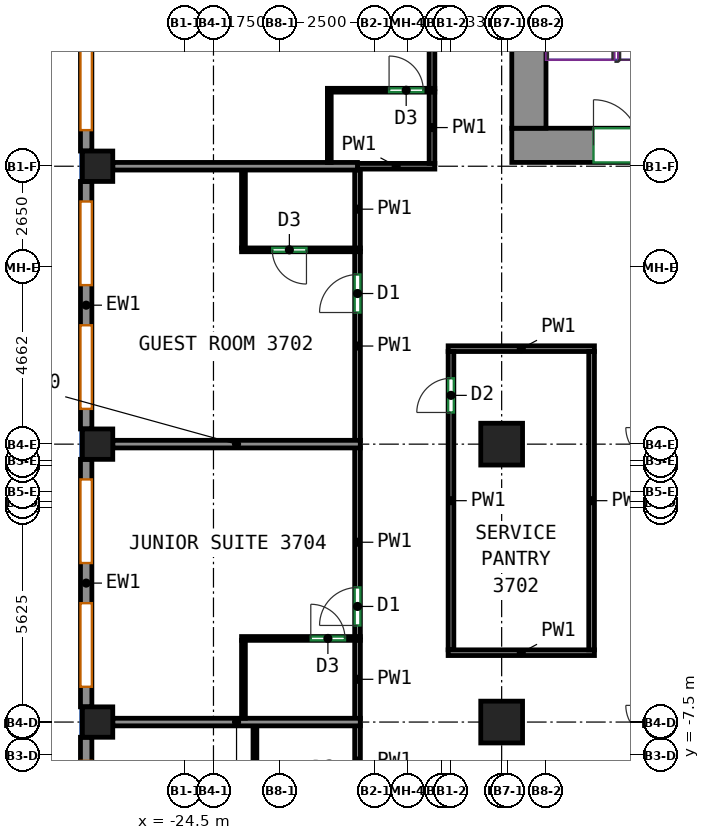
"""IFC4 building model, lengths in metres.
Left out: names, types, materials, properties, quantities, classifications, styles, units other than length and angle.
Written with IfcOpenShell. Run it as: python <this file> out.ifc"""

import sys

from ifc_helpers import new_model, si_unit, direction, frame, frame_2d, origin, origin_2d, place, context, subcontext, project, spatial, rectangle, extrude, source, transform, mapped, element, fill, save


model = new_model("IFC4")
c1 = context("Model", 3, precision=1e-05, world=origin(), true_north=direction((0.0, 1.0)))
c2 = subcontext(c1, "Body", "Model", "MODEL_VIEW")
j1 = project(units=[si_unit("LENGTHUNIT", "METRE"), si_unit("PLANEANGLEUNIT", "RADIAN")], contexts=[c1])
p1 = place(None, origin())
s1 = spatial("IfcSite", under=j1, at=p1, CompositionType="ELEMENT")
p2 = place(p1, origin())
s2 = spatial("IfcBuilding", under=s1, at=p2, CompositionType="ELEMENT")
p3 = place(p2, frame((0.0, 0.0, 160.9)))
s3 = spatial("IfcBuildingStorey", under=s2, at=p3, CompositionType="ELEMENT", Elevation=160.9)
m1 = source(origin(), c2, "Body", "SweptSolid", [
    extrude(rectangle(XDim=0.8, YDim=0.8, at=origin_2d()), origin(), (0.0, 0.0, 1.0), 3.0),
])
for number, where, z_axis, x_axis in (
    (1, (-26.8, -6.625, 0.0), (0.0, 0.0, 1.0), (1.0, 0.0, 0.0)),
    (2, (-26.8, 0.688, 0.0), (0.0, 0.0, 1.0), (1.0, 0.0, 0.0)),
    (3, (-26.8, 8.0, 0.0), (0.0, 0.0, 1.0), (1.0, 0.0, 0.0)),
):
    element("IfcColumn", number, at=place(p3, frame(where, z_axis=z_axis, x_axis=x_axis)), inside=s3, PredefinedType="COLUMN", context=c2, shape_type="MappedRepresentation", body=[
        mapped(m1, transform((0.0, 0.0, 0.0))),
    ])
m2 = source(origin(), c2, "Body", "SweptSolid", [
    extrude(rectangle(XDim=1.1, YDim=1.1, at=origin_2d()), origin(), (0.0, 0.0, 1.0), 3.0),
])
for number, where, z_axis, x_axis in (
    (4, (-16.167, -6.625, 0.0), (0.0, 0.0, 1.0), (1.0, 0.0, 0.0)),
    (5, (-16.167, 0.688, 0.0), (0.0, 0.0, 1.0), (1.0, 0.0, 0.0)),
):
    element("IfcColumn", number, at=place(p3, frame(where, z_axis=z_axis, x_axis=x_axis)), inside=s3, PredefinedType="COLUMN", context=c2, shape_type="MappedRepresentation", body=[
        mapped(m2, transform((0.0, 0.0, 0.0))),
    ])
m3 = source(origin(), c2, "Body", "SweptSolid", [
    extrude(rectangle(XDim=5.53, YDim=0.9, at=frame_2d((2.765, 0.0))), origin(), (0.0, 0.0, 1.0), 3.0),
])
p4 = place(p3, frame((-15.9, 8.55, 0.0), z_axis=(0.0, 0.0, 1.0), x_axis=(1.0, 0.0, 0.0)))
e6 = element("IfcWall", 6, at=p4, inside=s3, PredefinedType="SHEAR", context=c2, shape_type="MappedRepresentation", body=[
    mapped(m3, transform((0.0, 0.0, 0.0))),
])
p5 = place(p4, frame((2.15, 0.0, 0.0)))
e7 = element("IfcOpeningElement", 7, at=p5, cuts=e6, PredefinedType="OPENING", context=c2, shape_type="SweptSolid", body=[
    extrude(rectangle(XDim=1.2, YDim=2.1, at=frame_2d((0.6, 1.05))), frame((0.0, 0.46, 0.0), z_axis=(0.0, -1.0, 0.0), x_axis=(1.0, 0.0, 0.0)), (0.0, 0.0, 1.0), 0.92),
])
m4 = source(origin(), c2, "Body", "SweptSolid", [
    extrude(rectangle(XDim=12.0, YDim=0.9, at=frame_2d((6.0, 0.0))), origin(), (0.0, 0.0, 1.0), 3.0),
])
p6 = place(p3, frame((-15.45, 9.0, 0.0), z_axis=(0.0, 0.0, 1.0), x_axis=(0.0, 1.0, 0.0)))
e8 = element("IfcWall", 8, at=p6, inside=s3, PredefinedType="SHEAR", context=c2, shape_type="MappedRepresentation", body=[
    mapped(m4, transform((0.0, 0.0, 0.0))),
])
m5 = source(origin(), c2, "Body", "SweptSolid", [
    extrude(rectangle(XDim=13.2, YDim=0.3, at=frame_2d((6.6, 0.0))), origin(), (0.0, 0.0, 1.0), 3.0),
])
p7 = place(p3, frame((-27.1, 21.6, 0.0), z_axis=(0.0, 0.0, 1.0), x_axis=(0.0, -1.0, 0.0)))
e9 = element("IfcWall", 9, at=p7, inside=s3, PredefinedType="SOLIDWALL", context=c2, shape_type="MappedRepresentation", body=[
    mapped(m5, transform((0.0, 0.0, 0.0))),
])
p8 = place(p7, frame((0.55, 0.0, 0.85)))
e10 = element("IfcOpeningElement", 10, at=p8, cuts=e9, PredefinedType="OPENING", context=c2, shape_type="SweptSolid", body=[
    extrude(rectangle(XDim=2.2, YDim=1.95, at=frame_2d((1.1, 0.975))), frame((0.0, 0.16, 0.0), z_axis=(0.0, -1.0, 0.0), x_axis=(1.0, 0.0, 0.0)), (0.0, 0.0, 1.0), 0.32),
])
p9 = place(p7, frame((3.85, 0.0, 0.85)))
e11 = element("IfcOpeningElement", 11, at=p9, cuts=e9, PredefinedType="OPENING", context=c2, shape_type="SweptSolid", body=[
    extrude(rectangle(XDim=2.2, YDim=1.95, at=frame_2d((1.1, 0.975))), frame((0.0, 0.16, 0.0), z_axis=(0.0, -1.0, 0.0), x_axis=(1.0, 0.0, 0.0)), (0.0, 0.0, 1.0), 0.32),
])
p10 = place(p7, frame((7.15, 0.0, 0.85)))
e12 = element("IfcOpeningElement", 12, at=p10, cuts=e9, PredefinedType="OPENING", context=c2, shape_type="SweptSolid", body=[
    extrude(rectangle(XDim=2.2, YDim=1.95, at=frame_2d((1.1, 0.975))), frame((0.0, 0.16, 0.0), z_axis=(0.0, -1.0, 0.0), x_axis=(1.0, 0.0, 0.0)), (0.0, 0.0, 1.0), 0.32),
])
p11 = place(p7, frame((10.45, 0.0, 0.85)))
e13 = element("IfcOpeningElement", 13, at=p11, cuts=e9, PredefinedType="OPENING", context=c2, shape_type="SweptSolid", body=[
    extrude(rectangle(XDim=2.2, YDim=1.95, at=frame_2d((1.1, 0.975))), frame((0.0, 0.16, 0.0), z_axis=(0.0, -1.0, 0.0), x_axis=(1.0, 0.0, 0.0)), (0.0, 0.0, 1.0), 0.32),
])
m6 = source(origin(), c2, "Body", "SweptSolid", [
    extrude(rectangle(XDim=6.513, YDim=0.3, at=frame_2d((3.256, 0.0))), origin(), (0.0, 0.0, 1.0), 3.0),
])
p12 = place(p3, frame((-27.1, 7.6, 0.0), z_axis=(0.0, 0.0, 1.0), x_axis=(0.0, -1.0, 0.0)))
e14 = element("IfcWall", 14, at=p12, inside=s3, PredefinedType="SOLIDWALL", context=c2, shape_type="MappedRepresentation", body=[
    mapped(m6, transform((0.0, 0.0, 0.0))),
])
p13 = place(p12, frame((0.528, 0.0, 0.85)))
e15 = element("IfcOpeningElement", 15, at=p13, cuts=e14, PredefinedType="OPENING", context=c2, shape_type="SweptSolid", body=[
    extrude(rectangle(XDim=2.2, YDim=1.95, at=frame_2d((1.1, 0.975))), frame((0.0, 0.16, 0.0), z_axis=(0.0, -1.0, 0.0), x_axis=(1.0, 0.0, 0.0)), (0.0, 0.0, 1.0), 0.32),
])
p14 = place(p12, frame((3.784, 0.0, 0.85)))
e16 = element("IfcOpeningElement", 16, at=p14, cuts=e14, PredefinedType="OPENING", context=c2, shape_type="SweptSolid", body=[
    extrude(rectangle(XDim=2.2, YDim=1.95, at=frame_2d((1.1, 0.975))), frame((0.0, 0.16, 0.0), z_axis=(0.0, -1.0, 0.0), x_axis=(1.0, 0.0, 0.0)), (0.0, 0.0, 1.0), 0.32),
])
p15 = place(p3, frame((-27.1, 0.288, 0.0), z_axis=(0.0, 0.0, 1.0), x_axis=(0.0, -1.0, 0.0)))
e17 = element("IfcWall", 17, at=p15, inside=s3, PredefinedType="SOLIDWALL", context=c2, shape_type="MappedRepresentation", body=[
    mapped(m6, transform((0.0, 0.0, 0.0))),
])
p16 = place(p15, frame((0.528, 0.0, 0.85)))
e18 = element("IfcOpeningElement", 18, at=p16, cuts=e17, PredefinedType="OPENING", context=c2, shape_type="SweptSolid", body=[
    extrude(rectangle(XDim=2.2, YDim=1.95, at=frame_2d((1.1, 0.975))), frame((0.0, 0.16, 0.0), z_axis=(0.0, -1.0, 0.0), x_axis=(1.0, 0.0, 0.0)), (0.0, 0.0, 1.0), 0.32),
])
p17 = place(p15, frame((3.784, 0.0, 0.85)))
e19 = element("IfcOpeningElement", 19, at=p17, cuts=e17, PredefinedType="OPENING", context=c2, shape_type="SweptSolid", body=[
    extrude(rectangle(XDim=2.2, YDim=1.95, at=frame_2d((1.1, 0.975))), frame((0.0, 0.16, 0.0), z_axis=(0.0, -1.0, 0.0), x_axis=(1.0, 0.0, 0.0)), (0.0, 0.0, 1.0), 0.32),
])
m7 = source(origin(), c2, "Body", "SweptSolid", [
    extrude(rectangle(XDim=10.325, YDim=0.3, at=frame_2d((5.163, 0.0))), origin(), (0.0, 0.0, 1.0), 3.0),
])
p18 = place(p3, frame((-27.1, -7.025, 0.0), z_axis=(0.0, 0.0, 1.0), x_axis=(0.0, -1.0, 0.0)))
e20 = element("IfcWall", 20, at=p18, inside=s3, PredefinedType="SOLIDWALL", context=c2, shape_type="MappedRepresentation", body=[
    mapped(m7, transform((0.0, 0.0, 0.0))),
])
p19 = place(p18, frame((0.621, 0.0, 0.85)))
e21 = element("IfcOpeningElement", 21, at=p19, cuts=e20, PredefinedType="OPENING", context=c2, shape_type="SweptSolid", body=[
    extrude(rectangle(XDim=2.2, YDim=1.95, at=frame_2d((1.1, 0.975))), frame((0.0, 0.16, 0.0), z_axis=(0.0, -1.0, 0.0), x_axis=(1.0, 0.0, 0.0)), (0.0, 0.0, 1.0), 0.32),
])
p20 = place(p18, frame((4.062, 0.0, 0.85)))
e22 = element("IfcOpeningElement", 22, at=p20, cuts=e20, PredefinedType="OPENING", context=c2, shape_type="SweptSolid", body=[
    extrude(rectangle(XDim=2.2, YDim=1.95, at=frame_2d((1.1, 0.975))), frame((0.0, 0.16, 0.0), z_axis=(0.0, -1.0, 0.0), x_axis=(1.0, 0.0, 0.0)), (0.0, 0.0, 1.0), 0.32),
])
p21 = place(p18, frame((7.504, 0.0, 0.85)))
e23 = element("IfcOpeningElement", 23, at=p21, cuts=e20, PredefinedType="OPENING", context=c2, shape_type="SweptSolid", body=[
    extrude(rectangle(XDim=2.2, YDim=1.95, at=frame_2d((1.1, 0.975))), frame((0.0, 0.16, 0.0), z_axis=(0.0, -1.0, 0.0), x_axis=(1.0, 0.0, 0.0)), (0.0, 0.0, 1.0), 0.32),
])
p22 = place(p3, frame((-19.959, -8.585, 0.0), z_axis=(0.0, 0.0, 1.0), x_axis=(0.0, 1.0, 0.0)))
e24 = element("IfcWall", 24, at=p22, inside=s3, PredefinedType="PARTITIONING", context=c2, shape_type="SweptSolid", body=[
    extrude(rectangle(XDim=1.87, YDim=0.15, at=frame_2d((0.935, 0.0))), origin(), (0.0, 0.0, 1.0), 3.0),
])
p23 = place(p3, frame((-19.959, -4.385, 0.0), z_axis=(0.0, 0.0, 1.0), x_axis=(0.0, 1.0, 0.0)))
e25 = element("IfcWall", 25, at=p23, inside=s3, PredefinedType="PARTITIONING", context=c2, shape_type="SweptSolid", body=[
    extrude(rectangle(XDim=4.983, YDim=0.15, at=frame_2d((2.491, 0.0))), origin(), (0.0, 0.0, 1.0), 3.0),
])
p24 = place(p23, frame((0.302, 0.0, 0.0)))
e26 = element("IfcOpeningElement", 26, at=p24, cuts=e25, PredefinedType="OPENING", context=c2, shape_type="SweptSolid", body=[
    extrude(rectangle(XDim=1.0, YDim=2.1, at=frame_2d((0.5, 1.05))), frame((0.0, 0.085, 0.0), z_axis=(0.0, -1.0, 0.0), x_axis=(1.0, 0.0, 0.0)), (0.0, 0.0, 1.0), 0.17),
])
p25 = place(p3, frame((-19.959, -6.535, 0.0), z_axis=(0.0, 0.0, 1.0), x_axis=(0.0, 1.0, 0.0)))
e27 = element("IfcWall", 27, at=p25, inside=s3, PredefinedType="PARTITIONING", context=c2, shape_type="SweptSolid", body=[
    extrude(rectangle(XDim=2.07, YDim=0.15, at=frame_2d((1.035, 0.0))), origin(), (0.0, 0.0, 1.0), 3.0),
])
p26 = place(p3, frame((-19.959, 0.778, 0.0), z_axis=(0.0, 0.0, 1.0), x_axis=(0.0, 1.0, 0.0)))
e28 = element("IfcWall", 28, at=p26, inside=s3, PredefinedType="PARTITIONING", context=c2, shape_type="SweptSolid", body=[
    extrude(rectangle(XDim=4.982, YDim=0.15, at=frame_2d((2.491, 0.0))), origin(), (0.0, 0.0, 1.0), 3.0),
])
p27 = place(p26, frame((3.373, 0.0, 0.0)))
e29 = element("IfcOpeningElement", 29, at=p27, cuts=e28, PredefinedType="OPENING", context=c2, shape_type="SweptSolid", body=[
    extrude(rectangle(XDim=1.0, YDim=2.1, at=frame_2d((0.5, 1.05))), frame((0.0, 0.085, 0.0), z_axis=(0.0, -1.0, 0.0), x_axis=(1.0, 0.0, 0.0)), (0.0, 0.0, 1.0), 0.17),
])
p28 = place(p3, frame((-19.959, 5.84, 0.0), z_axis=(0.0, 0.0, 1.0), x_axis=(0.0, 1.0, 0.0)))
e30 = element("IfcWall", 30, at=p28, inside=s3, PredefinedType="PARTITIONING", context=c2, shape_type="SweptSolid", body=[
    extrude(rectangle(XDim=2.06, YDim=0.15, at=frame_2d((1.03, 0.0))), origin(), (0.0, 0.0, 1.0), 3.0),
])
p29 = place(p3, frame((-18.0, 10.04, 0.0), z_axis=(0.0, 0.0, 1.0), x_axis=(0.0, 1.0, 0.0)))
e31 = element("IfcWall", 31, at=p29, inside=s3, PredefinedType="PARTITIONING", context=c2, shape_type="SweptSolid", body=[
    extrude(rectangle(XDim=11.885, YDim=0.15, at=frame_2d((5.942, 0.0))), origin(), (0.0, 0.0, 1.0), 3.0),
])
p30 = place(p29, frame((9.778, 0.0, 0.0)))
e32 = element("IfcOpeningElement", 32, at=p30, cuts=e31, PredefinedType="OPENING", context=c2, shape_type="SweptSolid", body=[
    extrude(rectangle(XDim=1.0, YDim=2.1, at=frame_2d((0.5, 1.05))), frame((0.0, 0.085, 0.0), z_axis=(0.0, -1.0, 0.0), x_axis=(1.0, 0.0, 0.0)), (0.0, 0.0, 1.0), 0.17),
])
p31 = place(p3, frame((-17.925, 8.0, 0.0), z_axis=(0.0, 0.0, 1.0), x_axis=(-1.0, 0.0, 0.0)))
e33 = element("IfcWall", 33, at=p31, inside=s3, PredefinedType="PARTITIONING", context=c2, shape_type="SweptSolid", body=[
    extrude(rectangle(XDim=2.034, YDim=0.15, at=frame_2d((1.017, 0.0))), origin(), (0.0, 0.0, 1.0), 3.0),
])
p32 = place(p3, frame((-18.0, 8.075, 0.0), z_axis=(0.0, 0.0, 1.0), x_axis=(0.0, 1.0, 0.0)))
e34 = element("IfcWall", 34, at=p32, inside=s3, PredefinedType="PARTITIONING", context=c2, shape_type="SweptSolid", body=[
    extrude(rectangle(XDim=1.885, YDim=0.15, at=frame_2d((0.942, 0.0))), origin(), (0.0, 0.0, 1.0), 3.0),
])
p33 = place(p3, frame((-17.575, 3.2, 0.0), z_axis=(0.0, 0.0, 1.0), x_axis=(1.0, 0.0, 0.0)))
e35 = element("IfcWall", 35, at=p33, inside=s3, PredefinedType="PARTITIONING", context=c2, shape_type="SweptSolid", body=[
    extrude(rectangle(XDim=3.85, YDim=0.15, at=frame_2d((1.925, 0.0))), origin(), (0.0, 0.0, 1.0), 3.0),
])
p34 = place(p3, frame((-17.5, -4.725, 0.0), z_axis=(0.0, 0.0, 1.0), x_axis=(0.0, 1.0, 0.0)))
e36 = element("IfcWall", 36, at=p34, inside=s3, PredefinedType="PARTITIONING", context=c2, shape_type="SweptSolid", body=[
    extrude(rectangle(XDim=7.85, YDim=0.15, at=frame_2d((3.925, 0.0))), origin(), (0.0, 0.0, 1.0), 3.0),
])
p35 = place(p34, frame((6.246, 0.0, 0.0)))
e37 = element("IfcOpeningElement", 37, at=p35, cuts=e36, PredefinedType="OPENING", context=c2, shape_type="SweptSolid", body=[
    extrude(rectangle(XDim=0.9, YDim=2.1, at=frame_2d((0.45, 1.05))), frame((0.0, 0.085, 0.0), z_axis=(0.0, -1.0, 0.0), x_axis=(1.0, 0.0, 0.0)), (0.0, 0.0, 1.0), 0.17),
])
p36 = place(p3, frame((-13.725, -4.8, 0.0), z_axis=(0.0, 0.0, 1.0), x_axis=(-1.0, 0.0, 0.0)))
e38 = element("IfcWall", 38, at=p36, inside=s3, PredefinedType="PARTITIONING", context=c2, shape_type="SweptSolid", body=[
    extrude(rectangle(XDim=3.85, YDim=0.15, at=frame_2d((1.925, 0.0))), origin(), (0.0, 0.0, 1.0), 3.0),
])
p37 = place(p3, frame((-13.8, 3.125, 0.0), z_axis=(0.0, 0.0, 1.0), x_axis=(0.0, -1.0, 0.0)))
e39 = element("IfcWall", 39, at=p37, inside=s3, PredefinedType="PARTITIONING", context=c2, shape_type="SweptSolid", body=[
    extrude(rectangle(XDim=7.85, YDim=0.15, at=frame_2d((3.925, 0.0))), origin(), (0.0, 0.0, 1.0), 3.0),
])
p38 = place(p3, frame((-22.659, -8.575, 0.0), z_axis=(0.0, 0.0, 1.0), x_axis=(0.0, 1.0, 0.0)))
e40 = element("IfcWall", 40, at=p38, inside=s3, PredefinedType="PARTITIONING", context=c2, shape_type="SweptSolid", body=[
    extrude(rectangle(XDim=1.85, YDim=0.1, at=frame_2d((0.925, 0.0))), origin(), (0.0, 0.0, 1.0), 3.0),
])
p39 = place(p3, frame((-26.4, -6.625, 0.0), z_axis=(0.0, 0.0, 1.0), x_axis=(1.0, 0.0, 0.0)))
e41 = element("IfcWall", 41, at=p39, inside=s3, PredefinedType="PARTITIONING", context=c2, shape_type="SweptSolid", body=[
    extrude(rectangle(XDim=6.514, YDim=0.2, at=frame_2d((3.257, 0.0))), origin(), (0.0, 0.0, 1.0), 2.4),
])
p40 = place(p3, frame((-22.961, -6.525, 0.0), z_axis=(0.0, 0.0, 1.0), x_axis=(0.0, 1.0, 0.0)))
e42 = element("IfcWall", 42, at=p40, inside=s3, PredefinedType="PARTITIONING", context=c2, shape_type="SweptSolid", body=[
    extrude(rectangle(XDim=2.05, YDim=0.1, at=frame_2d((1.025, 0.0))), origin(), (0.0, 0.0, 1.0), 3.0),
])
p41 = place(p3, frame((-23.011, -4.425, 0.0), z_axis=(0.0, 0.0, 1.0), x_axis=(1.0, 0.0, 0.0)))
e43 = element("IfcWall", 43, at=p41, inside=s3, PredefinedType="PARTITIONING", context=c2, shape_type="SweptSolid", body=[
    extrude(rectangle(XDim=3.125, YDim=0.1, at=frame_2d((1.562, 0.0))), origin(), (0.0, 0.0, 1.0), 3.0),
])
p42 = place(p41, frame((1.822, 0.0, 0.0)))
e44 = element("IfcOpeningElement", 44, at=p42, cuts=e43, PredefinedType="OPENING", context=c2, shape_type="SweptSolid", body=[
    extrude(rectangle(XDim=0.9, YDim=2.1, at=frame_2d((0.45, 1.05))), frame((0.0, 0.06, 0.0), z_axis=(0.0, -1.0, 0.0), x_axis=(1.0, 0.0, 0.0)), (0.0, 0.0, 1.0), 0.12),
])
p43 = place(p3, frame((-26.4, 0.688, 0.0), z_axis=(0.0, 0.0, 1.0), x_axis=(1.0, 0.0, 0.0)))
e45 = element("IfcWall", 45, at=p43, inside=s3, PredefinedType="PARTITIONING", context=c2, shape_type="SweptSolid", body=[
    extrude(rectangle(XDim=6.514, YDim=0.2, at=frame_2d((3.257, 0.0))), origin(), (0.0, 0.0, 1.0), 2.4),
])
p44 = place(p3, frame((-22.961, 5.85, 0.0), z_axis=(0.0, 0.0, 1.0), x_axis=(0.0, 1.0, 0.0)))
e46 = element("IfcWall", 46, at=p44, inside=s3, PredefinedType="PARTITIONING", context=c2, shape_type="SweptSolid", body=[
    extrude(rectangle(XDim=2.05, YDim=0.1, at=frame_2d((1.025, 0.0))), origin(), (0.0, 0.0, 1.0), 3.0),
])
p45 = place(p3, frame((-19.886, 5.8, 0.0), z_axis=(0.0, 0.0, 1.0), x_axis=(-1.0, 0.0, 0.0)))
e47 = element("IfcWall", 47, at=p45, inside=s3, PredefinedType="PARTITIONING", context=c2, shape_type="SweptSolid", body=[
    extrude(rectangle(XDim=3.125, YDim=0.1, at=frame_2d((1.562, 0.0))), origin(), (0.0, 0.0, 1.0), 3.0),
])
p46 = place(p45, frame((1.417, 0.0, 0.0)))
e48 = element("IfcOpeningElement", 48, at=p46, cuts=e47, PredefinedType="OPENING", context=c2, shape_type="SweptSolid", body=[
    extrude(rectangle(XDim=0.9, YDim=2.1, at=frame_2d((0.45, 1.05))), frame((0.0, 0.06, 0.0), z_axis=(0.0, -1.0, 0.0), x_axis=(1.0, 0.0, 0.0)), (0.0, 0.0, 1.0), 0.12),
])
p47 = place(p3, frame((-26.4, 8.0, 0.0), z_axis=(0.0, 0.0, 1.0), x_axis=(1.0, 0.0, 0.0)))
e49 = element("IfcWall", 49, at=p47, inside=s3, PredefinedType="PARTITIONING", context=c2, shape_type="SweptSolid", body=[
    extrude(rectangle(XDim=6.439, YDim=0.2, at=frame_2d((3.219, 0.0))), origin(), (0.0, 0.0, 1.0), 3.0),
])
p48 = place(p3, frame((-20.752, 10.0, 0.0), z_axis=(0.0, 0.0, 1.0), x_axis=(1.0, 0.0, 0.0)))
e50 = element("IfcWall", 50, at=p48, inside=s3, PredefinedType="PARTITIONING", context=c2, shape_type="SweptSolid", body=[
    extrude(rectangle(XDim=2.825, YDim=0.1, at=frame_2d((1.413, 0.0))), origin(), (0.0, 0.0, 1.0), 3.0),
])
p49 = place(p48, frame((1.623, 0.0, 0.0)))
e51 = element("IfcOpeningElement", 51, at=p49, cuts=e50, PredefinedType="OPENING", context=c2, shape_type="SweptSolid", body=[
    extrude(rectangle(XDim=0.9, YDim=2.1, at=frame_2d((0.45, 1.05))), frame((0.0, 0.06, 0.0), z_axis=(0.0, -1.0, 0.0), x_axis=(1.0, 0.0, 0.0)), (0.0, 0.0, 1.0), 0.12),
])
p50 = place(p3, frame((-20.702, 8.1, 0.0), z_axis=(0.0, 0.0, 1.0), x_axis=(0.0, 1.0, 0.0)))
e52 = element("IfcWall", 52, at=p50, inside=s3, PredefinedType="PARTITIONING", context=c2, shape_type="SweptSolid", body=[
    extrude(rectangle(XDim=1.85, YDim=0.1, at=frame_2d((0.925, 0.0))), origin(), (0.0, 0.0, 1.0), 3.0),
])
p51 = place(p11, origin())
e53 = element("IfcWindow", 53, at=p51, inside=s3, PartitioningType="SINGLE_PANEL", PredefinedType="WINDOW", context=c2, shape_type="SweptSolid", body=[
    extrude(rectangle(XDim=2.2, YDim=1.95, at=frame_2d((1.1, 0.975))), frame((0.0, 0.03, 0.0), z_axis=(0.0, -1.0, 0.0), x_axis=(1.0, 0.0, 0.0)), (0.0, 0.0, 1.0), 0.06),
])
fill(e13, e53)
p52 = place(p13, origin())
e54 = element("IfcWindow", 54, at=p52, inside=s3, PartitioningType="SINGLE_PANEL", PredefinedType="WINDOW", context=c2, shape_type="SweptSolid", body=[
    extrude(rectangle(XDim=2.2, YDim=1.95, at=frame_2d((1.1, 0.975))), frame((0.0, 0.03, 0.0), z_axis=(0.0, -1.0, 0.0), x_axis=(1.0, 0.0, 0.0)), (0.0, 0.0, 1.0), 0.06),
])
fill(e15, e54)
p53 = place(p14, origin())
e55 = element("IfcWindow", 55, at=p53, inside=s3, PartitioningType="SINGLE_PANEL", PredefinedType="WINDOW", context=c2, shape_type="SweptSolid", body=[
    extrude(rectangle(XDim=2.2, YDim=1.95, at=frame_2d((1.1, 0.975))), frame((0.0, 0.03, 0.0), z_axis=(0.0, -1.0, 0.0), x_axis=(1.0, 0.0, 0.0)), (0.0, 0.0, 1.0), 0.06),
])
fill(e16, e55)
p54 = place(p16, origin())
e56 = element("IfcWindow", 56, at=p54, inside=s3, PartitioningType="SINGLE_PANEL", PredefinedType="WINDOW", context=c2, shape_type="SweptSolid", body=[
    extrude(rectangle(XDim=2.2, YDim=1.95, at=frame_2d((1.1, 0.975))), frame((0.0, 0.03, 0.0), z_axis=(0.0, -1.0, 0.0), x_axis=(1.0, 0.0, 0.0)), (0.0, 0.0, 1.0), 0.06),
])
fill(e18, e56)
p55 = place(p17, origin())
e57 = element("IfcWindow", 57, at=p55, inside=s3, PartitioningType="SINGLE_PANEL", PredefinedType="WINDOW", context=c2, shape_type="SweptSolid", body=[
    extrude(rectangle(XDim=2.2, YDim=1.95, at=frame_2d((1.1, 0.975))), frame((0.0, 0.03, 0.0), z_axis=(0.0, -1.0, 0.0), x_axis=(1.0, 0.0, 0.0)), (0.0, 0.0, 1.0), 0.06),
])
fill(e19, e57)
p56 = place(p5, origin())
e58 = element("IfcDoor", 58, at=p56, inside=s3, OperationType="DOUBLE_DOOR_SINGLE_SWING", PredefinedType="DOOR", context=c2, shape_type="SweptSolid", body=[
    extrude(rectangle(XDim=1.2, YDim=2.1, at=frame_2d((0.6, 1.05))), frame((0.0, 0.355, 0.0), z_axis=(0.0, -1.0, 0.0), x_axis=(1.0, 0.0, 0.0)), (0.0, 0.0, 1.0), 0.05),
])
fill(e7, e58)
p57 = place(p42, origin())
e59 = element("IfcDoor", 59, at=p57, inside=s3, OperationType="SINGLE_SWING_LEFT", PredefinedType="DOOR", context=c2, shape_type="SweptSolid", body=[
    extrude(rectangle(XDim=0.9, YDim=2.1, at=frame_2d((0.45, 1.05))), frame((0.0, 0.025, 0.0), z_axis=(0.0, -1.0, 0.0), x_axis=(1.0, 0.0, 0.0)), (0.0, 0.0, 1.0), 0.05),
])
fill(e44, e59)
p58 = place(p24, origin())
e60 = element("IfcDoor", 60, at=p58, inside=s3, OperationType="SINGLE_SWING_LEFT", PredefinedType="DOOR", context=c2, shape_type="SweptSolid", body=[
    extrude(rectangle(XDim=1.0, YDim=2.1, at=frame_2d((0.5, 1.05))), frame((0.0, 0.025, 0.0), z_axis=(0.0, -1.0, 0.0), x_axis=(1.0, 0.0, 0.0)), (0.0, 0.0, 1.0), 0.05),
])
fill(e26, e60)
p59 = place(p35, origin())
e61 = element("IfcDoor", 61, at=p59, inside=s3, OperationType="SINGLE_SWING_LEFT", PredefinedType="DOOR", context=c2, shape_type="SweptSolid", body=[
    extrude(rectangle(XDim=0.9, YDim=2.1, at=frame_2d((0.45, 1.05))), frame((0.0, 0.025, 0.0), z_axis=(0.0, -1.0, 0.0), x_axis=(1.0, 0.0, 0.0)), (0.0, 0.0, 1.0), 0.05),
])
fill(e37, e61)
p60 = place(p27, origin())
e62 = element("IfcDoor", 62, at=p60, inside=s3, OperationType="SINGLE_SWING_LEFT", PredefinedType="DOOR", context=c2, shape_type="SweptSolid", body=[
    extrude(rectangle(XDim=1.0, YDim=2.1, at=frame_2d((0.5, 1.05))), frame((0.0, 0.025, 0.0), z_axis=(0.0, -1.0, 0.0), x_axis=(1.0, 0.0, 0.0)), (0.0, 0.0, 1.0), 0.05),
])
fill(e29, e62)
p61 = place(p46, origin())
e63 = element("IfcDoor", 63, at=p61, inside=s3, OperationType="SINGLE_SWING_LEFT", PredefinedType="DOOR", context=c2, shape_type="SweptSolid", body=[
    extrude(rectangle(XDim=0.9, YDim=2.1, at=frame_2d((0.45, 1.05))), frame((0.0, 0.025, 0.0), z_axis=(0.0, -1.0, 0.0), x_axis=(1.0, 0.0, 0.0)), (0.0, 0.0, 1.0), 0.05),
])
fill(e48, e63)
p62 = place(p49, origin())
e64 = element("IfcDoor", 64, at=p62, inside=s3, OperationType="SINGLE_SWING_LEFT", PredefinedType="DOOR", context=c2, shape_type="SweptSolid", body=[
    extrude(rectangle(XDim=0.9, YDim=2.1, at=frame_2d((0.45, 1.05))), frame((0.0, 0.025, 0.0), z_axis=(0.0, -1.0, 0.0), x_axis=(1.0, 0.0, 0.0)), (0.0, 0.0, 1.0), 0.05),
])
fill(e51, e64)
save(model, sys.argv[1])
